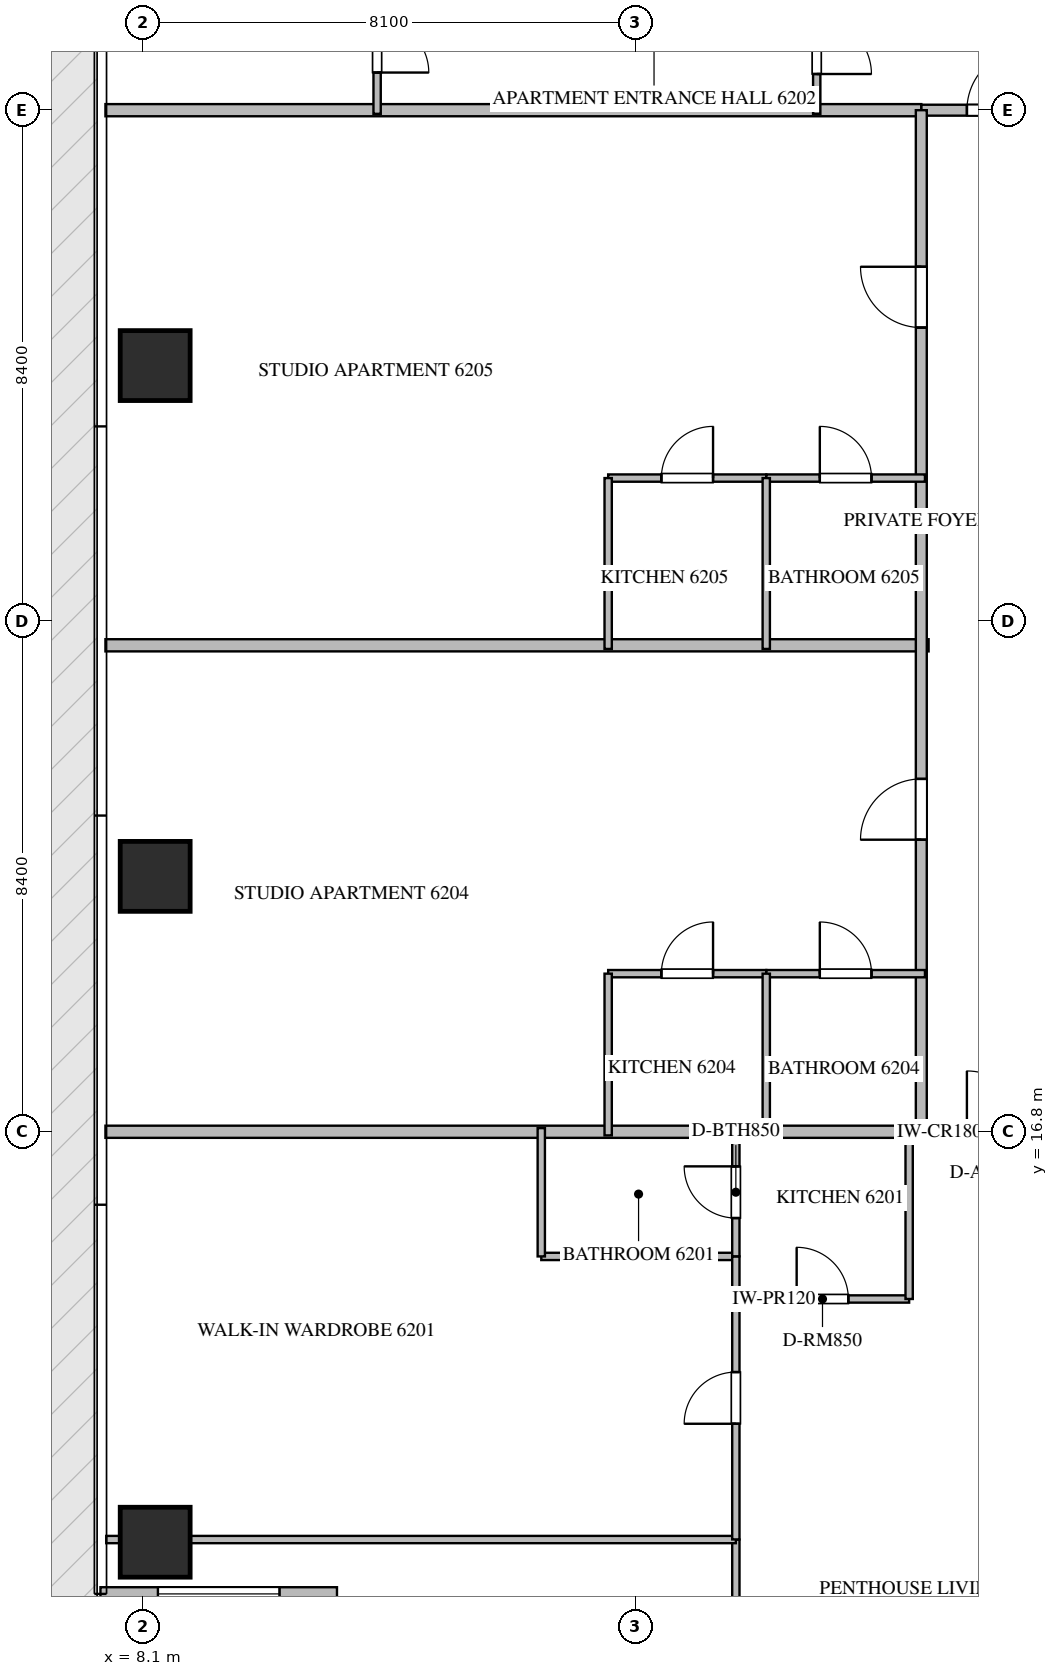
"""IFC4 building model, lengths in metres.
Left out: names, types, materials, properties, quantities, classifications, styles, units other than length and angle.
Written with IfcOpenShell. Run it as: python <this file> out.ifc"""

import sys

from ifc_helpers import new_model, si_unit, direction, frame, frame_2d, origin, origin_2d, place, context, subcontext, project, spatial, rectangle, extrude, source, transform, mapped, element, fill, save


model = new_model("IFC4")
c1 = context("Model", 3, precision=1e-05, world=origin(), true_north=direction((0.0, 1.0)))
c2 = subcontext(c1, "Body", "Model", "MODEL_VIEW")
j1 = project(units=[si_unit("LENGTHUNIT", "METRE"), si_unit("PLANEANGLEUNIT", "RADIAN")], contexts=[c1])
p1 = place(None, origin())
s1 = spatial("IfcSite", under=j1, at=p1, CompositionType="ELEMENT")
p2 = place(p1, origin())
s2 = spatial("IfcBuilding", under=s1, at=p2, CompositionType="ELEMENT")
p3 = place(p2, frame((0.0, 0.0, 248.95)))
s3 = spatial("IfcBuildingStorey", under=s2, at=p3, CompositionType="ELEMENT", Elevation=248.95)
m1 = source(origin(), c2, "Body", "SweptSolid", [
    extrude(rectangle(XDim=1.15, YDim=1.15, at=origin_2d()), origin(), (0.0, 0.0, 1.0), 3.85),
])
for number, where, z_axis, x_axis in (
    (1, (8.3, 10.05, -0.26), (0.0, 0.0, 1.0), (1.0, 0.0, 0.0)),
    (2, (8.3, 21.0, -0.26), (0.0, 0.0, 1.0), (1.0, 0.0, 0.0)),
    (3, (8.3, 29.4, -0.26), (0.0, 0.0, 1.0), (1.0, 0.0, 0.0)),
):
    element("IfcColumn", number, at=place(p3, frame(where, z_axis=z_axis, x_axis=x_axis)), inside=s3, PredefinedType="COLUMN", context=c2, shape_type="MappedRepresentation", body=[
        mapped(m1, transform((0.0, 0.0, 0.0), scale=1.0)),
    ])
p4 = place(p3, frame((7.4, 9.2, 0.0), z_axis=(0.0, 0.0, 1.0), x_axis=(1.0, 0.0, 0.0)))
e4 = element("IfcWall", 4, at=p4, inside=s3, PredefinedType="ELEMENTEDWALL", context=c2, shape_type="SweptSolid", body=[
    extrude(rectangle(XDim=3.89, YDim=0.22, at=frame_2d((1.945, 0.0))), origin(), (0.0, 0.0, 1.0), 3.575),
])
p5 = place(p4, frame((0.945, 0.0, 0.65)))
e5 = element("IfcOpeningElement", 5, at=p5, cuts=e4, PredefinedType="OPENING", context=c2, shape_type="SweptSolid", body=[
    extrude(rectangle(XDim=2.0, YDim=2.2, at=frame_2d((1.0, 1.1))), frame((0.0, 0.12, 0.0), z_axis=(0.0, -1.0, 0.0), x_axis=(1.0, 0.0, 0.0)), (0.0, 0.0, 1.0), 0.24),
])
p6 = place(p3, frame((7.482, 24.8, 0.0), z_axis=(0.0, 0.0, 1.0), x_axis=(1.0, 0.0, 0.0)))
e6 = element("IfcWall", 6, at=p6, inside=s3, PredefinedType="PARTITIONING", context=c2, shape_type="SweptSolid", body=[
    extrude(rectangle(XDim=13.538, YDim=0.2, at=frame_2d((6.769, 0.0))), origin(), (0.0, 0.0, 1.0), 3.59),
])
for number, where, z_axis, x_axis in (
    (7, (7.482, 16.8, 0.0), (0.0, 0.0, 1.0), (1.0, 0.0, 0.0)),
    (8, (7.482, 33.6, 0.0), (0.0, 0.0, 1.0), (1.0, 0.0, 0.0)),
):
    element("IfcWall", number, at=place(p3, frame(where, z_axis=z_axis, x_axis=x_axis)), inside=s3, PredefinedType="PARTITIONING", context=c2, shape_type="SweptSolid", body=[
        extrude(rectangle(XDim=13.418, YDim=0.2, at=frame_2d((6.709, 0.0))), origin(), (0.0, 0.0, 1.0), 3.59),
    ])
p7 = place(p3, frame((20.902, 16.8, 0.0), z_axis=(0.0, 0.0, 1.0), x_axis=(1.0, 0.0, 0.0)))
e9 = element("IfcWall", 9, at=p7, inside=s3, PredefinedType="PARTITIONING", context=c2, shape_type="SweptSolid", body=[
    extrude(rectangle(XDim=2.496, YDim=0.18, at=frame_2d((1.248, 0.0))), origin(), (0.0, 0.0, 1.0), 3.59),
])
p8 = place(p7, frame((0.748, 0.0, 0.0)))
e10 = element("IfcOpeningElement", 10, at=p8, cuts=e9, PredefinedType="OPENING", context=c2, shape_type="SweptSolid", body=[
    extrude(rectangle(XDim=1.0, YDim=2.15, at=frame_2d((0.5, 1.075))), frame((0.0, 0.1, 0.0), z_axis=(0.0, -1.0, 0.0), x_axis=(1.0, 0.0, 0.0)), (0.0, 0.0, 1.0), 0.2),
])
p9 = place(p3, frame((20.902, 33.6, 0.0), z_axis=(0.0, 0.0, 1.0), x_axis=(1.0, 0.0, 0.0)))
e11 = element("IfcWall", 11, at=p9, inside=s3, PredefinedType="PARTITIONING", context=c2, shape_type="SweptSolid", body=[
    extrude(rectangle(XDim=2.496, YDim=0.18, at=frame_2d((1.248, 0.0))), origin(), (0.0, 0.0, 1.0), 3.59),
])
p10 = place(p9, frame((0.748, 0.0, 0.0)))
e12 = element("IfcOpeningElement", 12, at=p10, cuts=e11, PredefinedType="OPENING", context=c2, shape_type="SweptSolid", body=[
    extrude(rectangle(XDim=1.0, YDim=2.15, at=frame_2d((0.5, 1.075))), frame((0.0, 0.1, 0.0), z_axis=(0.0, -1.0, 0.0), x_axis=(1.0, 0.0, 0.0)), (0.0, 0.0, 1.0), 0.2),
])
p11 = place(p3, frame((20.9, 16.8, 0.0), z_axis=(0.0, 0.0, 1.0), x_axis=(0.0, 1.0, 0.0)))
e13 = element("IfcWall", 13, at=p11, inside=s3, PredefinedType="PARTITIONING", context=c2, shape_type="SweptSolid", body=[
    extrude(rectangle(XDim=16.8, YDim=0.18, at=frame_2d((8.4, 0.0))), origin(), (0.0, 0.0, 1.0), 3.59),
])
p12 = place(p11, frame((4.803, 0.0, 0.0)))
e14 = element("IfcOpeningElement", 14, at=p12, cuts=e13, PredefinedType="OPENING", context=c2, shape_type="SweptSolid", body=[
    extrude(rectangle(XDim=1.0, YDim=2.15, at=frame_2d((0.5, 1.075))), frame((0.0, 0.1, 0.0), z_axis=(0.0, -1.0, 0.0), x_axis=(1.0, 0.0, 0.0)), (0.0, 0.0, 1.0), 0.2),
])
p13 = place(p11, frame((13.225, 0.0, 0.0)))
e15 = element("IfcOpeningElement", 15, at=p13, cuts=e13, PredefinedType="OPENING", context=c2, shape_type="SweptSolid", body=[
    extrude(rectangle(XDim=1.0, YDim=2.15, at=frame_2d((0.5, 1.075))), frame((0.0, 0.1, 0.0), z_axis=(0.0, -1.0, 0.0), x_axis=(1.0, 0.0, 0.0)), (0.0, 0.0, 1.0), 0.2),
])
p14 = place(p3, frame((17.85, 14.05, 0.0), z_axis=(0.0, 0.0, 1.0), x_axis=(1.0, 0.0, 0.0)))
e16 = element("IfcWall", 16, at=p14, inside=s3, PredefinedType="PARTITIONING", context=c2, shape_type="SweptSolid", body=[
    extrude(rectangle(XDim=2.85, YDim=0.12, at=frame_2d((1.425, 0.0))), origin(), (0.0, 0.0, 1.0), 3.59),
])
p15 = place(p14, frame((1.0, 0.0, 0.0)))
e17 = element("IfcOpeningElement", 17, at=p15, cuts=e16, PredefinedType="OPENING", context=c2, shape_type="SweptSolid", body=[
    extrude(rectangle(XDim=0.85, YDim=2.1, at=frame_2d((0.425, 1.05))), frame((0.0, 0.07, 0.0), z_axis=(0.0, -1.0, 0.0), x_axis=(1.0, 0.0, 0.0)), (0.0, 0.0, 1.0), 0.14),
])
p16 = place(p3, frame((20.7, 14.05, 0.0), z_axis=(0.0, 0.0, 1.0), x_axis=(0.0, 1.0, 0.0)))
e18 = element("IfcWall", 18, at=p16, inside=s3, PredefinedType="PARTITIONING", context=c2, shape_type="SweptSolid", body=[
    extrude(rectangle(XDim=2.81, YDim=0.12, at=frame_2d((1.405, 0.0))), origin(), (0.0, 0.0, 1.0), 3.59),
])
p17 = place(p3, frame((17.85, 1.295, 0.0), z_axis=(0.0, 0.0, 1.0), x_axis=(0.0, 1.0, 0.0)))
e19 = element("IfcWall", 19, at=p17, inside=s3, PredefinedType="PARTITIONING", context=c2, shape_type="SweptSolid", body=[
    extrude(rectangle(XDim=8.799, YDim=0.12, at=frame_2d((4.399, 0.0))), origin(), (0.0, 0.0, 1.0), 3.59),
])
p18 = place(p17, frame((4.344, 0.0, 0.0)))
e20 = element("IfcOpeningElement", 20, at=p18, cuts=e19, PredefinedType="OPENING", context=c2, shape_type="SweptSolid", body=[
    extrude(rectangle(XDim=0.9, YDim=2.1, at=frame_2d((0.45, 1.05))), frame((0.0, 0.07, 0.0), z_axis=(0.0, -1.0, 0.0), x_axis=(1.0, 0.0, 0.0)), (0.0, 0.0, 1.0), 0.14),
])
p19 = place(p3, frame((7.495, 10.094, 0.0), z_axis=(0.0, 0.0, 1.0), x_axis=(1.0, 0.0, 0.0)))
e21 = element("IfcWall", 21, at=p19, inside=s3, PredefinedType="PARTITIONING", context=c2, shape_type="SweptSolid", body=[
    extrude(rectangle(XDim=10.355, YDim=0.12, at=frame_2d((5.177, 0.0))), origin(), (0.0, 0.0, 1.0), 3.122),
])
p20 = place(p3, frame((14.65, 14.75, 0.0), z_axis=(0.0, 0.0, 1.0), x_axis=(1.0, 0.0, 0.0)))
e22 = element("IfcWall", 22, at=p20, inside=s3, PredefinedType="PARTITIONING", context=c2, shape_type="SweptSolid", body=[
    extrude(rectangle(XDim=3.2, YDim=0.12, at=frame_2d((1.6, 0.0))), origin(), (0.0, 0.0, 1.0), 3.59),
])
p21 = place(p3, frame((14.65, 14.75, 0.0), z_axis=(0.0, 0.0, 1.0), x_axis=(0.0, 1.0, 0.0)))
e23 = element("IfcWall", 23, at=p21, inside=s3, PredefinedType="PARTITIONING", context=c2, shape_type="SweptSolid", body=[
    extrude(rectangle(XDim=2.11, YDim=0.12, at=frame_2d((1.055, 0.0))), origin(), (0.0, 0.0, 1.0), 3.59),
])
p22 = place(p3, frame((17.85, 10.096, 0.0), z_axis=(0.0, 0.0, 1.0), x_axis=(0.0, 1.0, 0.0)))
e24 = element("IfcWall", 24, at=p22, inside=s3, PredefinedType="PARTITIONING", context=c2, shape_type="SweptSolid", body=[
    extrude(rectangle(XDim=4.654, YDim=0.12, at=frame_2d((2.327, 0.0))), origin(), (0.0, 0.0, 1.0), 3.59),
])
p23 = place(p22, frame((1.902, 0.0, 0.0)))
e25 = element("IfcOpeningElement", 25, at=p23, cuts=e24, PredefinedType="OPENING", context=c2, shape_type="SweptSolid", body=[
    extrude(rectangle(XDim=0.85, YDim=2.1, at=frame_2d((0.425, 1.05))), frame((0.0, 0.07, 0.0), z_axis=(0.0, -1.0, 0.0), x_axis=(1.0, 0.0, 0.0)), (0.0, 0.0, 1.0), 0.14),
])
p24 = place(p3, frame((17.85, 14.752, 0.0), z_axis=(0.0, 0.0, 1.0), x_axis=(0.0, 1.0, 0.0)))
e26 = element("IfcWall", 26, at=p24, inside=s3, PredefinedType="PARTITIONING", context=c2, shape_type="SweptSolid", body=[
    extrude(rectangle(XDim=2.108, YDim=0.12, at=frame_2d((1.054, 0.0))), origin(), (0.0, 0.0, 1.0), 3.59),
])
p25 = place(p24, frame((0.629, 0.0, 0.0)))
e27 = element("IfcOpeningElement", 27, at=p25, cuts=e26, PredefinedType="OPENING", context=c2, shape_type="SweptSolid", body=[
    extrude(rectangle(XDim=0.85, YDim=2.1, at=frame_2d((0.425, 1.05))), frame((0.0, 0.07, 0.0), z_axis=(0.0, -1.0, 0.0), x_axis=(1.0, 0.0, 0.0)), (0.0, 0.0, 1.0), 0.14),
])
p26 = place(p3, frame((19.18, 35.75, 0.0), z_axis=(0.0, 0.0, 1.0), x_axis=(0.0, -1.0, 0.0)))
e28 = element("IfcWall", 28, at=p26, inside=s3, PredefinedType="PARTITIONING", context=c2, shape_type="SweptSolid", body=[
    extrude(rectangle(XDim=2.21, YDim=0.12, at=frame_2d((1.105, 0.0))), origin(), (0.0, 0.0, 1.0), 3.59),
])
p27 = place(p26, frame((0.655, 0.0, 0.0)))
e29 = element("IfcOpeningElement", 29, at=p27, cuts=e28, PredefinedType="OPENING", context=c2, shape_type="SweptSolid", body=[
    extrude(rectangle(XDim=0.9, YDim=2.1, at=frame_2d((0.45, 1.05))), frame((0.0, 0.07, 0.0), z_axis=(0.0, -1.0, 0.0), x_axis=(1.0, 0.0, 0.0)), (0.0, 0.0, 1.0), 0.14),
])
p28 = place(p3, frame((11.95, 35.748, 0.0), z_axis=(0.0, 0.0, 1.0), x_axis=(0.0, -1.0, 0.0)))
e30 = element("IfcWall", 30, at=p28, inside=s3, PredefinedType="PARTITIONING", context=c2, shape_type="SweptSolid", body=[
    extrude(rectangle(XDim=2.208, YDim=0.12, at=frame_2d((1.104, 0.0))), origin(), (0.0, 0.0, 1.0), 3.59),
])
p29 = place(p28, frame((0.679, 0.0, 0.0)))
e31 = element("IfcOpeningElement", 31, at=p29, cuts=e30, PredefinedType="OPENING", context=c2, shape_type="SweptSolid", body=[
    extrude(rectangle(XDim=0.85, YDim=2.1, at=frame_2d((0.425, 1.05))), frame((0.0, 0.07, 0.0), z_axis=(0.0, -1.0, 0.0), x_axis=(1.0, 0.0, 0.0)), (0.0, 0.0, 1.0), 0.14),
])
p30 = place(p3, frame((15.75, 19.4, 0.0), z_axis=(0.0, 0.0, 1.0), x_axis=(1.0, 0.0, 0.0)))
e32 = element("IfcWall", 32, at=p30, inside=s3, PredefinedType="PARTITIONING", context=c2, shape_type="SweptSolid", body=[
    extrude(rectangle(XDim=2.6, YDim=0.12, at=frame_2d((1.3, 0.0))), origin(), (0.0, 0.0, 1.0), 3.59),
])
p31 = place(p30, frame((0.875, 0.0, 0.0)))
e33 = element("IfcOpeningElement", 33, at=p31, cuts=e32, PredefinedType="OPENING", context=c2, shape_type="SweptSolid", body=[
    extrude(rectangle(XDim=0.85, YDim=2.1, at=frame_2d((0.425, 1.05))), frame((0.0, 0.07, 0.0), z_axis=(0.0, -1.0, 0.0), x_axis=(1.0, 0.0, 0.0)), (0.0, 0.0, 1.0), 0.14),
])
p32 = place(p3, frame((18.352, 19.4, 0.0), z_axis=(0.0, 0.0, 1.0), x_axis=(1.0, 0.0, 0.0)))
e34 = element("IfcWall", 34, at=p32, inside=s3, PredefinedType="PARTITIONING", context=c2, shape_type="SweptSolid", body=[
    extrude(rectangle(XDim=2.608, YDim=0.12, at=frame_2d((1.304, 0.0))), origin(), (0.0, 0.0, 1.0), 3.59),
])
p33 = place(p32, frame((0.879, 0.0, 0.0)))
e35 = element("IfcOpeningElement", 35, at=p33, cuts=e34, PredefinedType="OPENING", context=c2, shape_type="SweptSolid", body=[
    extrude(rectangle(XDim=0.85, YDim=2.1, at=frame_2d((0.425, 1.05))), frame((0.0, 0.07, 0.0), z_axis=(0.0, -1.0, 0.0), x_axis=(1.0, 0.0, 0.0)), (0.0, 0.0, 1.0), 0.14),
])
for number, where, z_axis, x_axis in (
    (36, (18.35, 16.74, 0.0), (0.0, 0.0, 1.0), (0.0, 1.0, 0.0)),
    (37, (15.75, 16.74, 0.0), (0.0, 0.0, 1.0), (0.0, 1.0, 0.0)),
):
    element("IfcWall", number, at=place(p3, frame(where, z_axis=z_axis, x_axis=x_axis)), inside=s3, PredefinedType="PARTITIONING", context=c2, shape_type="SweptSolid", body=[
        extrude(rectangle(XDim=2.66, YDim=0.12, at=frame_2d((1.33, 0.0))), origin(), (0.0, 0.0, 1.0), 3.59),
    ])
p34 = place(p3, frame((15.75, 27.55, 0.0), z_axis=(0.0, 0.0, 1.0), x_axis=(1.0, 0.0, 0.0)))
e38 = element("IfcWall", 38, at=p34, inside=s3, PredefinedType="PARTITIONING", context=c2, shape_type="SweptSolid", body=[
    extrude(rectangle(XDim=2.6, YDim=0.12, at=frame_2d((1.3, 0.0))), origin(), (0.0, 0.0, 1.0), 3.59),
])
p35 = place(p34, frame((0.875, 0.0, 0.0)))
e39 = element("IfcOpeningElement", 39, at=p35, cuts=e38, PredefinedType="OPENING", context=c2, shape_type="SweptSolid", body=[
    extrude(rectangle(XDim=0.85, YDim=2.1, at=frame_2d((0.425, 1.05))), frame((0.0, 0.07, 0.0), z_axis=(0.0, -1.0, 0.0), x_axis=(1.0, 0.0, 0.0)), (0.0, 0.0, 1.0), 0.14),
])
p36 = place(p3, frame((18.352, 27.55, 0.0), z_axis=(0.0, 0.0, 1.0), x_axis=(1.0, 0.0, 0.0)))
e40 = element("IfcWall", 40, at=p36, inside=s3, PredefinedType="PARTITIONING", context=c2, shape_type="SweptSolid", body=[
    extrude(rectangle(XDim=2.608, YDim=0.12, at=frame_2d((1.304, 0.0))), origin(), (0.0, 0.0, 1.0), 3.59),
])
p37 = place(p36, frame((0.879, 0.0, 0.0)))
e41 = element("IfcOpeningElement", 41, at=p37, cuts=e40, PredefinedType="OPENING", context=c2, shape_type="SweptSolid", body=[
    extrude(rectangle(XDim=0.85, YDim=2.1, at=frame_2d((0.425, 1.05))), frame((0.0, 0.07, 0.0), z_axis=(0.0, -1.0, 0.0), x_axis=(1.0, 0.0, 0.0)), (0.0, 0.0, 1.0), 0.14),
])
for number, where, z_axis, x_axis in (
    (42, (18.35, 24.74, 0.0), (0.0, 0.0, 1.0), (0.0, 1.0, 0.0)),
    (43, (15.75, 24.74, 0.0), (0.0, 0.0, 1.0), (0.0, 1.0, 0.0)),
):
    element("IfcWall", number, at=place(p3, frame(where, z_axis=z_axis, x_axis=x_axis)), inside=s3, PredefinedType="PARTITIONING", context=c2, shape_type="SweptSolid", body=[
        extrude(rectangle(XDim=2.81, YDim=0.12, at=frame_2d((1.405, 0.0))), origin(), (0.0, 0.0, 1.0), 3.59),
    ])
m2 = source(origin(), c2, "Body", "SweptSolid", [
    extrude(rectangle(XDim=2.0, YDim=2.2, at=frame_2d((1.0, 1.1))), frame((0.0, 0.03, 0.0), z_axis=(0.0, -1.0, 0.0), x_axis=(1.0, 0.0, 0.0)), (0.0, 0.0, 1.0), 0.06),
])
p38 = place(p5, origin())
e44 = element("IfcWindow", 44, at=p38, inside=s3, PartitioningType="SINGLE_PANEL", PredefinedType="WINDOW", context=c2, shape_type="MappedRepresentation", body=[
    mapped(m2, transform((0.0, 0.0, 0.0), scale=1.0)),
])
fill(e5, e44)
m3 = source(origin(), c2, "Body", "SweptSolid", [
    extrude(rectangle(XDim=1.0, YDim=2.15, at=frame_2d((0.5, 1.075))), frame((0.0, 0.025, 0.0), z_axis=(0.0, -1.0, 0.0), x_axis=(1.0, 0.0, 0.0)), (0.0, 0.0, 1.0), 0.05),
])
p39 = place(p8, origin())
e45 = element("IfcDoor", 45, at=p39, inside=s3, OperationType="SINGLE_SWING_LEFT", PredefinedType="DOOR", context=c2, shape_type="MappedRepresentation", body=[
    mapped(m3, transform((0.0, 0.0, 0.0), scale=1.0)),
])
fill(e10, e45)
p40 = place(p10, origin())
e46 = element("IfcDoor", 46, at=p40, inside=s3, OperationType="SINGLE_SWING_RIGHT", PredefinedType="DOOR", context=c2, shape_type="MappedRepresentation", body=[
    mapped(m3, transform((0.0, 0.0, 0.0), scale=1.0)),
])
fill(e12, e46)
p41 = place(p12, origin())
e47 = element("IfcDoor", 47, at=p41, inside=s3, OperationType="SINGLE_SWING_LEFT", PredefinedType="DOOR", context=c2, shape_type="MappedRepresentation", body=[
    mapped(m3, transform((0.0, 0.0, 0.0), scale=1.0)),
])
fill(e14, e47)
p42 = place(p13, origin())
e48 = element("IfcDoor", 48, at=p42, inside=s3, OperationType="SINGLE_SWING_RIGHT", PredefinedType="DOOR", context=c2, shape_type="MappedRepresentation", body=[
    mapped(m3, transform((0.0, 0.0, 0.0), scale=1.0)),
])
fill(e15, e48)
m4 = source(origin(), c2, "Body", "SweptSolid", [
    extrude(rectangle(XDim=0.85, YDim=2.1, at=frame_2d((0.425, 1.05))), frame((0.0, 0.025, 0.0), z_axis=(0.0, -1.0, 0.0), x_axis=(1.0, 0.0, 0.0)), (0.0, 0.0, 1.0), 0.05),
])
p43 = place(p15, origin())
e49 = element("IfcDoor", 49, at=p43, inside=s3, OperationType="SINGLE_SWING_LEFT", PredefinedType="DOOR", context=c2, shape_type="MappedRepresentation", body=[
    mapped(m4, transform((0.0, 0.0, 0.0), scale=1.0)),
])
fill(e17, e49)
p44 = place(p23, origin())
e50 = element("IfcDoor", 50, at=p44, inside=s3, OperationType="SINGLE_SWING_LEFT", PredefinedType="DOOR", context=c2, shape_type="MappedRepresentation", body=[
    mapped(m4, transform((0.0, 0.0, 0.0), scale=1.0)),
])
fill(e25, e50)
p45 = place(p25, origin())
e51 = element("IfcDoor", 51, at=p45, inside=s3, OperationType="SINGLE_SWING_RIGHT", PredefinedType="DOOR", context=c2, shape_type="MappedRepresentation", body=[
    mapped(m4, transform((0.0, 0.0, 0.0), scale=1.0)),
])
fill(e27, e51)
m5 = source(origin(), c2, "Body", "SweptSolid", [
    extrude(rectangle(XDim=0.9, YDim=2.1, at=frame_2d((0.45, 1.05))), frame((0.0, 0.025, 0.0), z_axis=(0.0, -1.0, 0.0), x_axis=(1.0, 0.0, 0.0)), (0.0, 0.0, 1.0), 0.05),
])
p46 = place(p27, origin())
e52 = element("IfcDoor", 52, at=p46, inside=s3, OperationType="SINGLE_SWING_RIGHT", PredefinedType="DOOR", context=c2, shape_type="MappedRepresentation", body=[
    mapped(m5, transform((0.0, 0.0, 0.0), scale=1.0)),
])
fill(e29, e52)
p47 = place(p29, origin())
e53 = element("IfcDoor", 53, at=p47, inside=s3, OperationType="SINGLE_SWING_RIGHT", PredefinedType="DOOR", context=c2, shape_type="MappedRepresentation", body=[
    mapped(m4, transform((0.0, 0.0, 0.0), scale=1.0)),
])
fill(e31, e53)
p48 = place(p31, origin())
e54 = element("IfcDoor", 54, at=p48, inside=s3, OperationType="SINGLE_SWING_RIGHT", PredefinedType="DOOR", context=c2, shape_type="MappedRepresentation", body=[
    mapped(m4, transform((0.0, 0.0, 0.0), scale=1.0)),
])
fill(e33, e54)
p49 = place(p33, origin())
e55 = element("IfcDoor", 55, at=p49, inside=s3, OperationType="SINGLE_SWING_LEFT", PredefinedType="DOOR", context=c2, shape_type="MappedRepresentation", body=[
    mapped(m4, transform((0.0, 0.0, 0.0), scale=1.0)),
])
fill(e35, e55)
p50 = place(p35, origin())
e56 = element("IfcDoor", 56, at=p50, inside=s3, OperationType="SINGLE_SWING_RIGHT", PredefinedType="DOOR", context=c2, shape_type="MappedRepresentation", body=[
    mapped(m4, transform((0.0, 0.0, 0.0), scale=1.0)),
])
fill(e39, e56)
p51 = place(p37, origin())
e57 = element("IfcDoor", 57, at=p51, inside=s3, OperationType="SINGLE_SWING_LEFT", PredefinedType="DOOR", context=c2, shape_type="MappedRepresentation", body=[
    mapped(m4, transform((0.0, 0.0, 0.0), scale=1.0)),
])
fill(e41, e57)
save(model, sys.argv[1])
